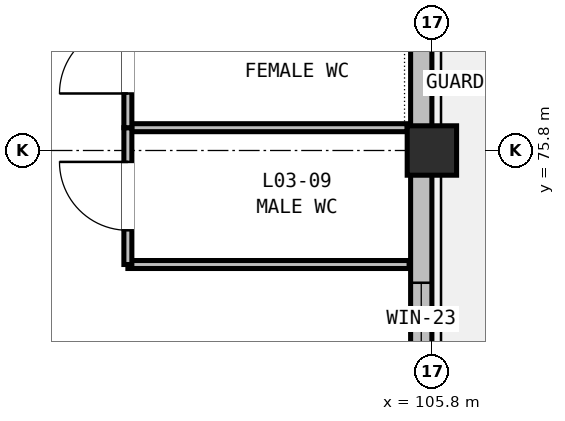
"""IFC4 building model, lengths in metres.
Left out: names, types, materials, properties, quantities, classifications, styles, units other than length and angle.
Written with IfcOpenShell. Run it as: python <this file> out.ifc"""

import sys

from ifc_helpers import new_model, si_unit, direction, frame, frame_2d, origin, origin_2d, place, context, subcontext, project, spatial, rectangle, extrude, element, fill, save


model = new_model("IFC4")
c1 = context("Model", 3, precision=1e-05, world=origin(), true_north=direction((0.0, 1.0)))
c2 = subcontext(c1, "Body", "Model", "MODEL_VIEW")
j1 = project(units=[si_unit("LENGTHUNIT", "METRE"), si_unit("PLANEANGLEUNIT", "RADIAN")], contexts=[c1])
p1 = place(None, origin())
s1 = spatial("IfcSite", under=j1, at=p1, CompositionType="ELEMENT")
p2 = place(p1, origin())
s2 = spatial("IfcBuilding", under=s1, at=p2, CompositionType="ELEMENT")
p3 = place(p2, frame((0.0, 0.0, 15.0)))
s3 = spatial("IfcBuildingStorey", under=s2, at=p3, CompositionType="ELEMENT", Elevation=15.0)
p4 = place(p3, frame((105.8, 75.8, 0.0), z_axis=(0.0, 0.0, 1.0), x_axis=(1.0, 0.0, 0.0)))
e1 = element("IfcColumn", 1, at=p4, inside=s3, PredefinedType="COLUMN", context=c2, shape_type="SweptSolid", body=[
    extrude(rectangle(XDim=0.65, YDim=0.65, at=origin_2d()), origin(), (0.0, 0.0, 1.0), 4.44),
])
p5 = place(p3, frame((105.66, 83.92, 0.0), z_axis=(0.0, 0.0, 1.0), x_axis=(0.0, -1.0, 0.0)))
e2 = element("IfcWall", 2, at=p5, inside=s3, PredefinedType="STANDARD", context=c2, shape_type="SweptSolid", body=[
    extrude(rectangle(XDim=8.12, YDim=0.28, at=frame_2d((4.06, 0.0))), origin(), (0.0, 0.0, 1.0), 3.785),
])
p6 = place(p5, frame((1.395, 0.0, 0.0)))
e3 = element("IfcOpeningElement", 3, at=p6, cuts=e2, PredefinedType="OPENING", context=c2, shape_type="SweptSolid", body=[
    extrude(rectangle(XDim=1.05, YDim=2.2, at=frame_2d((0.525, 1.1))), frame((0.0, 0.15, 0.0), z_axis=(0.0, -1.0, 0.0), x_axis=(1.0, 0.0, 0.0)), (0.0, 0.0, 1.0), 0.3),
])
p7 = place(p3, frame((105.66, 75.8, 0.0), z_axis=(0.0, 0.0, 1.0), x_axis=(0.0, -1.0, 0.0)))
e4 = element("IfcWall", 4, at=p7, inside=s3, PredefinedType="STANDARD", context=c2, shape_type="SweptSolid", body=[
    extrude(rectangle(XDim=3.32, YDim=0.28, at=frame_2d((1.66, 0.0))), origin(), (0.0, 0.0, 1.0), 3.785),
])
p8 = place(p7, frame((1.74, 0.0, 0.9)))
e5 = element("IfcOpeningElement", 5, at=p8, cuts=e4, PredefinedType="OPENING", context=c2, shape_type="SweptSolid", body=[
    extrude(rectangle(XDim=0.95, YDim=1.8, at=frame_2d((0.475, 0.9))), frame((0.0, 0.15, 0.0), z_axis=(0.0, -1.0, 0.0), x_axis=(1.0, 0.0, 0.0)), (0.0, 0.0, 1.0), 0.3),
])
p9 = place(p3, frame((101.8, 76.1, 0.0), z_axis=(0.0, 0.0, 1.0), x_axis=(1.0, 0.0, 0.0)))
e6 = element("IfcWall", 6, at=p9, inside=s3, PredefinedType="PARTITIONING", context=c2, shape_type="SweptSolid", body=[
    extrude(rectangle(XDim=3.675, YDim=0.105, at=frame_2d((1.837, 0.0))), origin(), (0.0, 0.0, 1.0), 3.835),
])
p10 = place(p3, frame((105.5, 74.3, 0.0), z_axis=(0.0, 0.0, 1.0), x_axis=(-1.0, 0.0, 0.0)))
e7 = element("IfcWall", 7, at=p10, inside=s3, PredefinedType="PARTITIONING", context=c2, shape_type="SweptSolid", body=[
    extrude(rectangle(XDim=3.7, YDim=0.105, at=frame_2d((1.85, 0.0))), origin(), (0.0, 0.0, 1.0), 4.195),
])
p11 = place(p3, frame((101.8, 74.3, 0.0), z_axis=(0.0, 0.0, 1.0), x_axis=(0.0, 1.0, 0.0)))
e8 = element("IfcWall", 8, at=p11, inside=s3, PredefinedType="PARTITIONING", context=c2, shape_type="SweptSolid", body=[
    extrude(rectangle(XDim=1.8, YDim=0.105, at=frame_2d((0.9, 0.0))), origin(), (0.0, 0.0, 1.0), 3.835),
])
p12 = place(p11, frame((0.45, 0.0, 0.0)))
e9 = element("IfcOpeningElement", 9, at=p12, cuts=e8, PredefinedType="OPENING", context=c2, shape_type="SweptSolid", body=[
    extrude(rectangle(XDim=0.9, YDim=2.02, at=frame_2d((0.45, 1.01))), frame((0.0, 0.062, 0.0), z_axis=(0.0, -1.0, 0.0), x_axis=(1.0, 0.0, 0.0)), (0.0, 0.0, 1.0), 0.125),
])
p13 = place(p3, frame((101.8, 76.1, 0.0), z_axis=(0.0, 0.0, 1.0), x_axis=(0.0, 1.0, 0.0)))
e10 = element("IfcWall", 10, at=p13, inside=s3, PredefinedType="PARTITIONING", context=c2, shape_type="SweptSolid", body=[
    extrude(rectangle(XDim=1.8, YDim=0.105, at=frame_2d((0.9, 0.0))), origin(), (0.0, 0.0, 1.0), 3.835),
])
p14 = place(p13, frame((0.45, 0.0, 0.0)))
e11 = element("IfcOpeningElement", 11, at=p14, cuts=e10, PredefinedType="OPENING", context=c2, shape_type="SweptSolid", body=[
    extrude(rectangle(XDim=0.9, YDim=2.02, at=frame_2d((0.45, 1.01))), frame((0.0, 0.062, 0.0), z_axis=(0.0, -1.0, 0.0), x_axis=(1.0, 0.0, 0.0)), (0.0, 0.0, 1.0), 0.125),
])
p15 = place(p8, origin())
e12 = element("IfcWindow", 12, at=p15, inside=s3, PartitioningType="SINGLE_PANEL", PredefinedType="WINDOW", context=c2, shape_type="SweptSolid", body=[
    extrude(rectangle(XDim=0.95, YDim=1.8, at=frame_2d((0.475, 0.9))), frame((0.0, 0.03, 0.0), z_axis=(0.0, -1.0, 0.0), x_axis=(1.0, 0.0, 0.0)), (0.0, 0.0, 1.0), 0.06),
])
fill(e5, e12)
p16 = place(p12, origin())
e13 = element("IfcDoor", 13, at=p16, inside=s3, OperationType="SINGLE_SWING_RIGHT", PredefinedType="DOOR", context=c2, shape_type="SweptSolid", body=[
    extrude(rectangle(XDim=0.9, YDim=2.02, at=frame_2d((0.45, 1.01))), frame((0.0, 0.025, 0.0), z_axis=(0.0, -1.0, 0.0), x_axis=(1.0, 0.0, 0.0)), (0.0, 0.0, 1.0), 0.05),
])
fill(e9, e13)
p17 = place(p14, origin())
e14 = element("IfcDoor", 14, at=p17, inside=s3, OperationType="SINGLE_SWING_LEFT", PredefinedType="DOOR", context=c2, shape_type="SweptSolid", body=[
    extrude(rectangle(XDim=0.9, YDim=2.02, at=frame_2d((0.45, 1.01))), frame((0.0, 0.025, 0.0), z_axis=(0.0, -1.0, 0.0), x_axis=(1.0, 0.0, 0.0)), (0.0, 0.0, 1.0), 0.05),
])
fill(e11, e14)
save(model, sys.argv[1])
